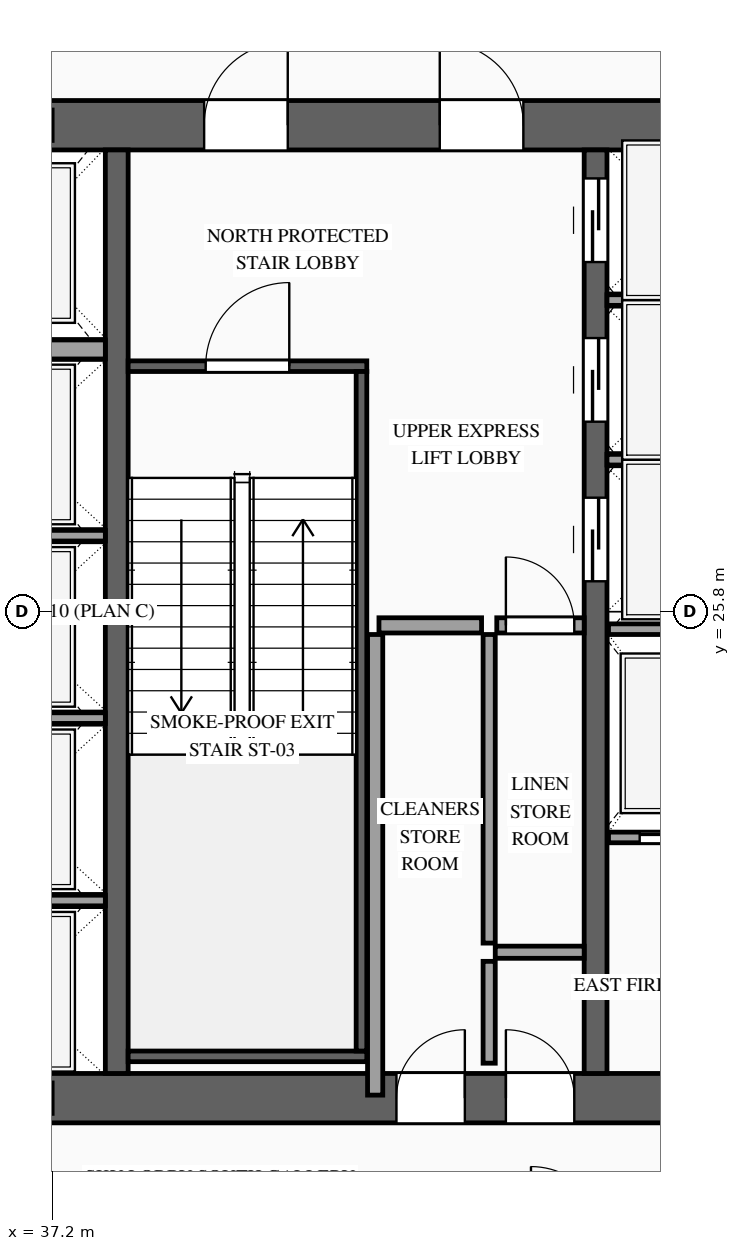
"""IFC4 building model, lengths in metres.
Left out: names, types, materials, properties, quantities, classifications, styles, units other than length and angle.
Written with IfcOpenShell. Run it as: python <this file> out.ifc"""

import sys

from ifc_helpers import new_model, si_unit, direction, frame, frame_2d, origin, place, context, subcontext, project, spatial, rectangle, extrude, source, transform, mapped, element, fill, save


model = new_model("IFC4")
c1 = context("Model", 3, precision=1e-05, world=origin(), true_north=direction((0.0, 1.0)))
c2 = subcontext(c1, "Body", "Model", "MODEL_VIEW")
j1 = project(units=[si_unit("LENGTHUNIT", "METRE"), si_unit("PLANEANGLEUNIT", "RADIAN")], contexts=[c1])
p1 = place(None, origin())
s1 = spatial("IfcSite", under=j1, at=p1, CompositionType="ELEMENT")
p2 = place(p1, origin())
s2 = spatial("IfcBuilding", under=s1, at=p2, CompositionType="ELEMENT")
p3 = place(p2, frame((0.0, 0.0, 166.8)))
s3 = spatial("IfcBuildingStorey", under=s2, at=p3, CompositionType="ELEMENT", Elevation=166.8)
p4 = place(p3, frame((23.475, 19.4, 0.0), z_axis=(0.0, 0.0, 1.0), x_axis=(1.0, 0.0, 0.0)))
e1 = element("IfcWall", 1, at=p4, inside=s3, PredefinedType="SHEAR", context=c2, shape_type="SweptSolid", body=[
    extrude(rectangle(XDim=27.05, YDim=0.65, at=frame_2d((13.525, 0.0))), origin(), (0.0, 0.0, 1.0), 4.8),
])
p5 = place(p4, frame((1.975, 0.0, 0.0)))
e2 = element("IfcOpeningElement", 2, at=p5, cuts=e1, PredefinedType="OPENING", context=c2, shape_type="SweptSolid", body=[
    extrude(rectangle(XDim=1.1, YDim=2.2, at=frame_2d((0.55, 1.1))), frame((0.0, 0.34, 0.0), z_axis=(0.0, -1.0, 0.0), x_axis=(1.0, 0.0, 0.0)), (0.0, 0.0, 1.0), 0.68),
])
p6 = place(p4, frame((9.875, 0.0, 0.0)))
e3 = element("IfcOpeningElement", 3, at=p6, cuts=e1, PredefinedType="OPENING", context=c2, shape_type="SweptSolid", body=[
    extrude(rectangle(XDim=1.1, YDim=2.2, at=frame_2d((0.55, 1.1))), frame((0.0, 0.34, 0.0), z_axis=(0.0, -1.0, 0.0), x_axis=(1.0, 0.0, 0.0)), (0.0, 0.0, 1.0), 0.68),
])
p7 = place(p4, frame((23.075, 0.0, 0.0)))
e4 = element("IfcOpeningElement", 4, at=p7, cuts=e1, PredefinedType="OPENING", context=c2, shape_type="SweptSolid", body=[
    extrude(rectangle(XDim=1.1, YDim=2.2, at=frame_2d((0.55, 1.1))), frame((0.0, 0.34, 0.0), z_axis=(0.0, -1.0, 0.0), x_axis=(1.0, 0.0, 0.0)), (0.0, 0.0, 1.0), 0.68),
])
p8 = place(p4, frame((19.695, 0.0, 0.0)))
e5 = element("IfcOpeningElement", 5, at=p8, cuts=e1, PredefinedType="OPENING", context=c2, shape_type="SweptSolid", body=[
    extrude(rectangle(XDim=0.9, YDim=2.15, at=frame_2d((0.45, 1.075))), frame((0.0, 0.34, 0.0), z_axis=(0.0, -1.0, 0.0), x_axis=(1.0, 0.0, 0.0)), (0.0, 0.0, 1.0), 0.68),
])
p9 = place(p4, frame((18.255, 0.0, 0.0)))
e6 = element("IfcOpeningElement", 6, at=p9, cuts=e1, PredefinedType="OPENING", context=c2, shape_type="SweptSolid", body=[
    extrude(rectangle(XDim=0.9, YDim=2.15, at=frame_2d((0.45, 1.075))), frame((0.0, 0.34, 0.0), z_axis=(0.0, -1.0, 0.0), x_axis=(1.0, 0.0, 0.0)), (0.0, 0.0, 1.0), 0.68),
])
p10 = place(p3, frame((23.475, 32.2, 0.0), z_axis=(0.0, 0.0, 1.0), x_axis=(1.0, 0.0, 0.0)))
e7 = element("IfcWall", 7, at=p10, inside=s3, PredefinedType="SHEAR", context=c2, shape_type="SweptSolid", body=[
    extrude(rectangle(XDim=27.05, YDim=0.65, at=frame_2d((13.525, 0.0))), origin(), (0.0, 0.0, 1.0), 4.8),
])
p11 = place(p10, frame((4.595, 0.0, 0.0)))
e8 = element("IfcOpeningElement", 8, at=p11, cuts=e7, PredefinedType="OPENING", context=c2, shape_type="SweptSolid", body=[
    extrude(rectangle(XDim=0.9, YDim=2.15, at=frame_2d((0.45, 1.075))), frame((0.0, 0.34, 0.0), z_axis=(0.0, -1.0, 0.0), x_axis=(1.0, 0.0, 0.0)), (0.0, 0.0, 1.0), 0.68),
])
p12 = place(p10, frame((9.875, 0.0, 0.0)))
e9 = element("IfcOpeningElement", 9, at=p12, cuts=e7, PredefinedType="OPENING", context=c2, shape_type="SweptSolid", body=[
    extrude(rectangle(XDim=1.1, YDim=2.2, at=frame_2d((0.55, 1.1))), frame((0.0, 0.34, 0.0), z_axis=(0.0, -1.0, 0.0), x_axis=(1.0, 0.0, 0.0)), (0.0, 0.0, 1.0), 0.68),
])
p13 = place(p10, frame((15.725, 0.0, 0.0)))
e10 = element("IfcOpeningElement", 10, at=p13, cuts=e7, PredefinedType="OPENING", context=c2, shape_type="SweptSolid", body=[
    extrude(rectangle(XDim=1.1, YDim=2.2, at=frame_2d((0.55, 1.1))), frame((0.0, 0.34, 0.0), z_axis=(0.0, -1.0, 0.0), x_axis=(1.0, 0.0, 0.0)), (0.0, 0.0, 1.0), 0.68),
])
p14 = place(p10, frame((18.825, 0.0, 0.0)))
e11 = element("IfcOpeningElement", 11, at=p14, cuts=e7, PredefinedType="OPENING", context=c2, shape_type="SweptSolid", body=[
    extrude(rectangle(XDim=1.1, YDim=2.2, at=frame_2d((0.55, 1.1))), frame((0.0, 0.34, 0.0), z_axis=(0.0, -1.0, 0.0), x_axis=(1.0, 0.0, 0.0)), (0.0, 0.0, 1.0), 0.68),
])
m1 = source(origin(), c2, "Body", "SweptSolid", [
    extrude(rectangle(XDim=12.15, YDim=0.3, at=frame_2d((6.075, 0.0))), origin(), (0.0, 0.0, 1.0), 4.8),
])
p15 = place(p3, frame((38.05, 19.725, 0.0), z_axis=(0.0, 0.0, 1.0), x_axis=(0.0, 1.0, 0.0)))
e12 = element("IfcWall", 12, at=p15, inside=s3, PredefinedType="SOLIDWALL", context=c2, shape_type="MappedRepresentation", body=[
    mapped(m1, transform((0.0, 0.0, 0.0), scale=1.0)),
])
p16 = place(p3, frame((44.35, 19.725, 0.0), z_axis=(0.0, 0.0, 1.0), x_axis=(0.0, 1.0, 0.0)))
e13 = element("IfcWall", 13, at=p16, inside=s3, PredefinedType="SOLIDWALL", context=c2, shape_type="SweptSolid", body=[
    extrude(rectangle(XDim=12.15, YDim=0.3, at=frame_2d((6.075, 0.0))), origin(), (0.0, 0.0, 1.0), 4.8),
])
p17 = place(p16, frame((6.475, 0.0, 0.0)))
e14 = element("IfcOpeningElement", 14, at=p17, cuts=e13, PredefinedType="OPENING", context=c2, shape_type="SweptSolid", body=[
    extrude(rectangle(XDim=1.1, YDim=2.2, at=frame_2d((0.55, 1.1))), frame((0.0, 0.165, 0.0), z_axis=(0.0, -1.0, 0.0), x_axis=(1.0, 0.0, 0.0)), (0.0, 0.0, 1.0), 0.33),
])
p18 = place(p16, frame((8.575, 0.0, 0.0)))
e15 = element("IfcOpeningElement", 15, at=p18, cuts=e13, PredefinedType="OPENING", context=c2, shape_type="SweptSolid", body=[
    extrude(rectangle(XDim=1.1, YDim=2.2, at=frame_2d((0.55, 1.1))), frame((0.0, 0.165, 0.0), z_axis=(0.0, -1.0, 0.0), x_axis=(1.0, 0.0, 0.0)), (0.0, 0.0, 1.0), 0.33),
])
p19 = place(p16, frame((10.675, 0.0, 0.0)))
e16 = element("IfcOpeningElement", 16, at=p19, cuts=e13, PredefinedType="OPENING", context=c2, shape_type="SweptSolid", body=[
    extrude(rectangle(XDim=1.1, YDim=2.2, at=frame_2d((0.55, 1.1))), frame((0.0, 0.165, 0.0), z_axis=(0.0, -1.0, 0.0), x_axis=(1.0, 0.0, 0.0)), (0.0, 0.0, 1.0), 0.33),
])
p20 = place(p3, frame((44.52, 22.83, 0.0), z_axis=(0.0, 0.0, 1.0), x_axis=(1.0, 0.0, 0.0)))
e17 = element("IfcWall", 17, at=p20, inside=s3, PredefinedType="SOLIDWALL", context=c2, shape_type="SweptSolid", body=[
    extrude(rectangle(XDim=1.92, YDim=0.14, at=frame_2d((0.96, 0.0))), origin(), (0.0, 0.0, 1.0), 4.5),
])
p21 = place(p20, frame((0.41, 0.0, 0.0)))
e18 = element("IfcOpeningElement", 18, at=p21, cuts=e17, PredefinedType="OPENING", context=c2, shape_type="SweptSolid", body=[
    extrude(rectangle(XDim=1.1, YDim=2.2, at=frame_2d((0.55, 1.1))), frame((0.0, 0.085, 0.0), z_axis=(0.0, -1.0, 0.0), x_axis=(1.0, 0.0, 0.0)), (0.0, 0.0, 1.0), 0.17),
])
m2 = source(origin(), c2, "Body", "SweptSolid", [
    extrude(rectangle(XDim=1.92, YDim=0.14, at=frame_2d((0.96, 0.0))), origin(), (0.0, 0.0, 1.0), 4.5),
])
p22 = place(p3, frame((44.52, 25.57, 0.0), z_axis=(0.0, 0.0, 1.0), x_axis=(1.0, 0.0, 0.0)))
e19 = element("IfcWall", 19, at=p22, inside=s3, PredefinedType="SOLIDWALL", context=c2, shape_type="MappedRepresentation", body=[
    mapped(m2, transform((0.0, 0.0, 0.0), scale=1.0)),
])
m3 = source(origin(), c2, "Body", "SweptSolid", [
    extrude(rectangle(XDim=2.4, YDim=0.14, at=frame_2d((1.2, 0.0))), origin(), (0.0, 0.0, 1.0), 4.5),
])
for number, where, z_axis, x_axis in (
    (20, (35.5, 22.0, 0.0), (0.0, 0.0, 1.0), (1.0, 0.0, 0.0)),
    (21, (35.5, 24.4, 0.0), (0.0, 0.0, 1.0), (1.0, 0.0, 0.0)),
    (22, (35.5, 26.8, 0.0), (0.0, 0.0, 1.0), (1.0, 0.0, 0.0)),
):
    element("IfcWall", number, at=place(p3, frame(where, z_axis=z_axis, x_axis=x_axis)), inside=s3, PredefinedType="SOLIDWALL", context=c2, shape_type="MappedRepresentation", body=[
        mapped(m3, transform((0.0, 0.0, 0.0), scale=1.0)),
    ])
m4 = source(origin(), c2, "Body", "SweptSolid", [
    extrude(rectangle(XDim=2.4, YDim=0.25, at=frame_2d((1.2, 0.0))), origin(), (0.0, 0.0, 1.0), 4.5),
])
p23 = place(p3, frame((35.5, 29.25, 0.0), z_axis=(0.0, 0.0, 1.0), x_axis=(1.0, 0.0, 0.0)))
e23 = element("IfcWall", 23, at=p23, inside=s3, PredefinedType="SOLIDWALL", context=c2, shape_type="MappedRepresentation", body=[
    mapped(m4, transform((0.0, 0.0, 0.0), scale=1.0)),
])
m5 = source(origin(), c2, "Body", "SweptSolid", [
    extrude(rectangle(XDim=2.0, YDim=0.14, at=frame_2d((1.0, 0.0))), origin(), (0.0, 0.0, 1.0), 4.5),
])
for number, where, z_axis, x_axis in (
    (24, (44.5, 27.8, 0.0), (0.0, 0.0, 1.0), (1.0, 0.0, 0.0)),
    (25, (44.5, 29.9, 0.0), (0.0, 0.0, 1.0), (1.0, 0.0, 0.0)),
):
    element("IfcWall", number, at=place(p3, frame(where, z_axis=z_axis, x_axis=x_axis)), inside=s3, PredefinedType="SOLIDWALL", context=c2, shape_type="MappedRepresentation", body=[
        mapped(m5, transform((0.0, 0.0, 0.0), scale=1.0)),
    ])
p24 = place(p3, frame((38.2, 29.03, 0.0), z_axis=(0.0, 0.0, 1.0), x_axis=(1.0, 0.0, 0.0)))
e26 = element("IfcWall", 26, at=p24, inside=s3, PredefinedType="SOLIDWALL", context=c2, shape_type="SweptSolid", body=[
    extrude(rectangle(XDim=3.14, YDim=0.14, at=frame_2d((1.57, 0.0))), origin(), (0.0, 0.0, 1.0), 4.5),
])
p25 = place(p24, frame((1.02, 0.0, 0.0)))
e27 = element("IfcOpeningElement", 27, at=p25, cuts=e26, PredefinedType="OPENING", context=c2, shape_type="SweptSolid", body=[
    extrude(rectangle(XDim=1.1, YDim=2.2, at=frame_2d((0.55, 1.1))), frame((0.0, 0.085, 0.0), z_axis=(0.0, -1.0, 0.0), x_axis=(1.0, 0.0, 0.0)), (0.0, 0.0, 1.0), 0.17),
])
m6 = source(origin(), c2, "Body", "SweptSolid", [
    extrude(rectangle(XDim=3.14, YDim=0.14, at=frame_2d((1.57, 0.0))), origin(), (0.0, 0.0, 1.0), 4.5),
])
p26 = place(p3, frame((38.2, 19.95, 0.0), z_axis=(0.0, 0.0, 1.0), x_axis=(1.0, 0.0, 0.0)))
e28 = element("IfcWall", 28, at=p26, inside=s3, PredefinedType="SOLIDWALL", context=c2, shape_type="MappedRepresentation", body=[
    mapped(m6, transform((0.0, 0.0, 0.0), scale=1.0)),
])
m7 = source(origin(), c2, "Body", "SweptSolid", [
    extrude(rectangle(XDim=8.94, YDim=0.14, at=frame_2d((4.47, 0.0))), origin(), (0.0, 0.0, 1.0), 4.5),
])
p27 = place(p3, frame((41.27, 20.02, 0.0), z_axis=(0.0, 0.0, 1.0), x_axis=(0.0, 1.0, 0.0)))
e29 = element("IfcWall", 29, at=p27, inside=s3, PredefinedType="SOLIDWALL", context=c2, shape_type="MappedRepresentation", body=[
    mapped(m7, transform((0.0, 0.0, 0.0), scale=1.0)),
])
m8 = source(origin(), c2, "Body", "SweptSolid", [
    extrude(rectangle(XDim=1.34, YDim=0.16, at=frame_2d((0.67, 0.0))), origin(), (0.0, 0.0, 1.0), 4.5),
])
p28 = place(p3, frame((42.95, 19.86, 0.0), z_axis=(0.0, 0.0, 1.0), x_axis=(0.0, 1.0, 0.0)))
e30 = element("IfcWall", 30, at=p28, inside=s3, PredefinedType="PARTITIONING", context=c2, shape_type="MappedRepresentation", body=[
    mapped(m8, transform((0.0, 0.0, 0.0), scale=1.0)),
])
m9 = source(origin(), c2, "Body", "SweptSolid", [
    extrude(rectangle(XDim=1.17, YDim=0.16, at=frame_2d((0.585, 0.0))), origin(), (0.0, 0.0, 1.0), 4.5),
])
p29 = place(p3, frame((43.03, 21.32, 0.0), z_axis=(0.0, 0.0, 1.0), x_axis=(1.0, 0.0, 0.0)))
e31 = element("IfcWall", 31, at=p29, inside=s3, PredefinedType="PARTITIONING", context=c2, shape_type="MappedRepresentation", body=[
    mapped(m9, transform((0.0, 0.0, 0.0), scale=1.0)),
])
m10 = source(origin(), c2, "Body", "SweptSolid", [
    extrude(rectangle(XDim=6.06, YDim=0.2, at=frame_2d((3.03, 0.0))), origin(), (0.0, 0.0, 1.0), 4.5),
])
p30 = place(p3, frame((41.45, 19.44, 0.0), z_axis=(0.0, 0.0, 1.0), x_axis=(0.0, 1.0, 0.0)))
e32 = element("IfcWall", 32, at=p30, inside=s3, PredefinedType="PARTITIONING", context=c2, shape_type="MappedRepresentation", body=[
    mapped(m10, transform((0.0, 0.0, 0.0), scale=1.0)),
])
m11 = source(origin(), c2, "Body", "SweptSolid", [
    extrude(rectangle(XDim=1.35, YDim=0.2, at=frame_2d((0.675, 0.0))), origin(), (0.0, 0.0, 1.0), 4.5),
])
p31 = place(p3, frame((41.5, 25.62, 0.0), z_axis=(0.0, 0.0, 1.0), x_axis=(1.0, 0.0, 0.0)))
e33 = element("IfcWall", 33, at=p31, inside=s3, PredefinedType="PARTITIONING", context=c2, shape_type="MappedRepresentation", body=[
    mapped(m11, transform((0.0, 0.0, 0.0), scale=1.0)),
])
m12 = source(origin(), c2, "Body", "SweptSolid", [
    extrude(rectangle(XDim=4.06, YDim=0.16, at=frame_2d((2.03, 0.0))), origin(), (0.0, 0.0, 1.0), 4.5),
])
p32 = place(p3, frame((42.95, 21.44, 0.0), z_axis=(0.0, 0.0, 1.0), x_axis=(0.0, 1.0, 0.0)))
e34 = element("IfcWall", 34, at=p32, inside=s3, PredefinedType="PARTITIONING", context=c2, shape_type="MappedRepresentation", body=[
    mapped(m12, transform((0.0, 0.0, 0.0), scale=1.0)),
])
p33 = place(p3, frame((43.05, 25.62, 0.0), z_axis=(0.0, 0.0, 1.0), x_axis=(1.0, 0.0, 0.0)))
e35 = element("IfcWall", 35, at=p33, inside=s3, PredefinedType="PARTITIONING", context=c2, shape_type="SweptSolid", body=[
    extrude(rectangle(XDim=1.15, YDim=0.2, at=frame_2d((0.575, 0.0))), origin(), (0.0, 0.0, 1.0), 4.5),
])
p34 = place(p33, frame((0.12, 0.0, 0.0)))
e36 = element("IfcOpeningElement", 36, at=p34, cuts=e35, PredefinedType="OPENING", context=c2, shape_type="SweptSolid", body=[
    extrude(rectangle(XDim=0.9, YDim=2.15, at=frame_2d((0.45, 1.075))), frame((0.0, 0.115, 0.0), z_axis=(0.0, -1.0, 0.0), x_axis=(1.0, 0.0, 0.0)), (0.0, 0.0, 1.0), 0.23),
])
m13 = source(origin(), c2, "Body", "SweptSolid", [
    extrude(rectangle(XDim=1.1, YDim=2.2, at=frame_2d((0.55, 1.1))), frame((0.0, 0.025, 0.0), z_axis=(0.0, -1.0, 0.0), x_axis=(1.0, 0.0, 0.0)), (0.0, 0.0, 1.0), 0.05),
])
p35 = place(p21, origin())
e37 = element("IfcDoor", 37, at=p35, inside=s3, OperationType="SLIDING_TO_RIGHT", PredefinedType="DOOR", context=c2, shape_type="MappedRepresentation", body=[
    mapped(m13, transform((0.0, 0.0, 0.0), scale=1.0)),
])
fill(e18, e37)
p36 = place(p17, origin())
e38 = element("IfcDoor", 38, at=p36, inside=s3, OperationType="SLIDING_TO_LEFT", PredefinedType="DOOR", context=c2, shape_type="MappedRepresentation", body=[
    mapped(m13, transform((0.0, 0.0, 0.0), scale=1.0)),
])
fill(e14, e38)
p37 = place(p18, origin())
e39 = element("IfcDoor", 39, at=p37, inside=s3, OperationType="SLIDING_TO_RIGHT", PredefinedType="DOOR", context=c2, shape_type="MappedRepresentation", body=[
    mapped(m13, transform((0.0, 0.0, 0.0), scale=1.0)),
])
fill(e15, e39)
p38 = place(p19, origin())
e40 = element("IfcDoor", 40, at=p38, inside=s3, OperationType="SLIDING_TO_LEFT", PredefinedType="DOOR", context=c2, shape_type="MappedRepresentation", body=[
    mapped(m13, transform((0.0, 0.0, 0.0), scale=1.0)),
])
fill(e16, e40)
m14 = source(origin(), c2, "Body", "SweptSolid", [
    extrude(rectangle(XDim=1.1, YDim=2.2, at=frame_2d((0.55, 1.1))), frame((0.0, 0.025, 0.0), z_axis=(0.0, -1.0, 0.0), x_axis=(1.0, 0.0, 0.0)), (0.0, 0.0, 1.0), 0.05),
])
p39 = place(p25, origin())
e41 = element("IfcDoor", 41, at=p39, inside=s3, OperationType="SINGLE_SWING_RIGHT", PredefinedType="DOOR", context=c2, shape_type="MappedRepresentation", body=[
    mapped(m14, transform((0.0, 0.0, 0.0), scale=1.0)),
])
fill(e27, e41)
p40 = place(p13, origin())
e42 = element("IfcDoor", 42, at=p40, inside=s3, OperationType="SINGLE_SWING_RIGHT", PredefinedType="DOOR", context=c2, shape_type="MappedRepresentation", body=[
    mapped(m14, transform((0.0, 0.0, 0.0), scale=1.0)),
])
fill(e10, e42)
p41 = place(p14, origin())
e43 = element("IfcDoor", 43, at=p41, inside=s3, OperationType="SINGLE_SWING_LEFT", PredefinedType="DOOR", context=c2, shape_type="MappedRepresentation", body=[
    mapped(m14, transform((0.0, 0.0, 0.0), scale=1.0)),
])
fill(e11, e43)
m15 = source(origin(), c2, "Body", "SweptSolid", [
    extrude(rectangle(XDim=0.9, YDim=2.15, at=frame_2d((0.45, 1.075))), frame((0.0, 0.025, 0.0), z_axis=(0.0, -1.0, 0.0), x_axis=(1.0, 0.0, 0.0)), (0.0, 0.0, 1.0), 0.05),
])
p42 = place(p8, origin())
e44 = element("IfcDoor", 44, at=p42, inside=s3, OperationType="SINGLE_SWING_LEFT", PredefinedType="DOOR", context=c2, shape_type="MappedRepresentation", body=[
    mapped(m15, transform((0.0, 0.0, 0.0), scale=1.0)),
])
fill(e5, e44)
p43 = place(p9, origin())
e45 = element("IfcDoor", 45, at=p43, inside=s3, OperationType="SINGLE_SWING_RIGHT", PredefinedType="DOOR", context=c2, shape_type="MappedRepresentation", body=[
    mapped(m15, transform((0.0, 0.0, 0.0), scale=1.0)),
])
fill(e6, e45)
p44 = place(p34, origin())
e46 = element("IfcDoor", 46, at=p44, inside=s3, OperationType="SINGLE_SWING_LEFT", PredefinedType="DOOR", context=c2, shape_type="MappedRepresentation", body=[
    mapped(m15, transform((0.0, 0.0, 0.0), scale=1.0)),
])
fill(e36, e46)
save(model, sys.argv[1])
